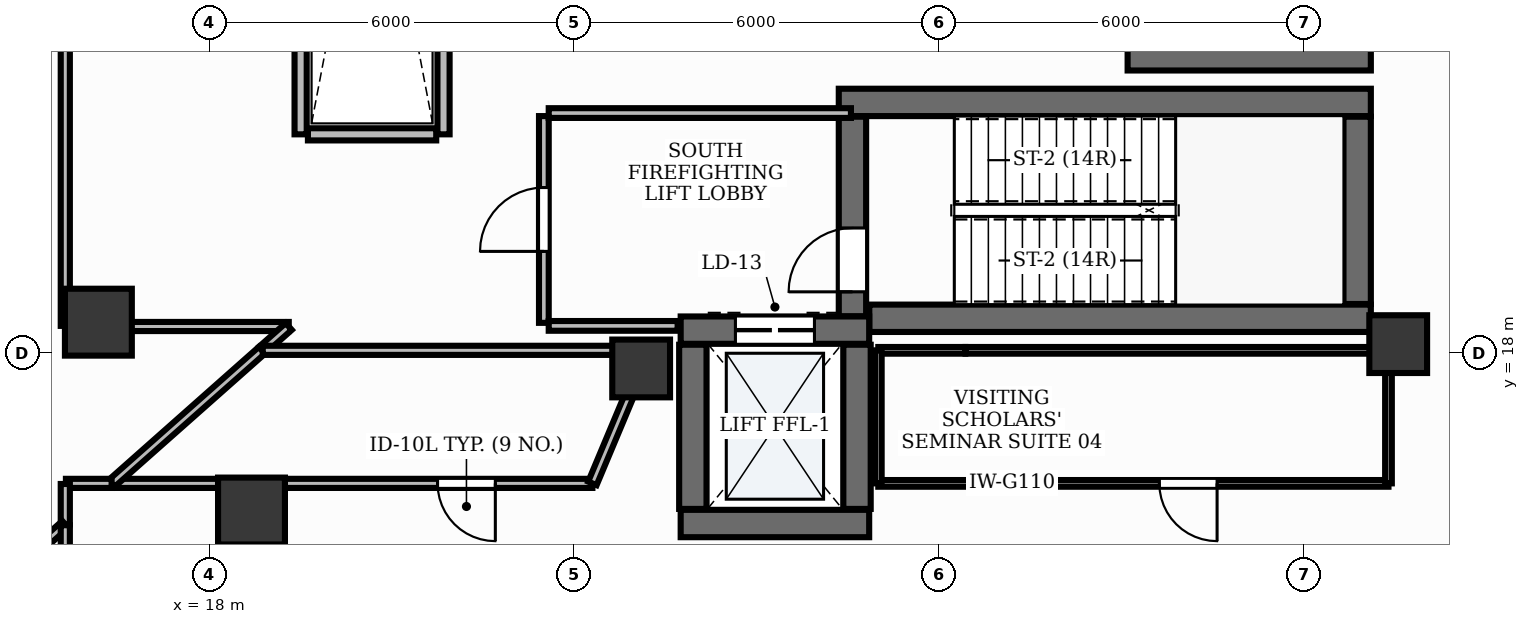
"""IFC4 building model, lengths in metres.
Left out: names, types, materials, properties, quantities, classifications, styles, units other than length and angle.
Written with IfcOpenShell. Run it as: python <this file> out.ifc"""

import sys

from ifc_helpers import new_model, si_unit, direction, frame, frame_2d, origin, origin_2d, place, context, subcontext, project, spatial, rectangle, extrude, element, fill, save


model = new_model("IFC4")
c1 = context("Model", 3, precision=1e-05, world=origin(), true_north=direction((0.0, 1.0)))
c2 = subcontext(c1, "Body", "Model", "MODEL_VIEW")
j1 = project(units=[si_unit("LENGTHUNIT", "METRE"), si_unit("PLANEANGLEUNIT", "RADIAN")], contexts=[c1])
p1 = place(None, origin())
s1 = spatial("IfcSite", under=j1, at=p1, CompositionType="ELEMENT")
p2 = place(p1, origin())
s2 = spatial("IfcBuilding", under=s1, at=p2, CompositionType="ELEMENT")
p3 = place(p2, frame((0.0, 0.0, 10.2)))
s3 = spatial("IfcBuildingStorey", under=s2, at=p3, CompositionType="ELEMENT", Elevation=10.2)
p4 = place(p3, frame((28.852, 18.575, 0.0), z_axis=(0.0, 0.0, 1.0), x_axis=(1.0, 0.0, 0.0)))
e1 = element("IfcWall", 1, at=p4, inside=s3, PredefinedType="SHEAR", context=c2, shape_type="SweptSolid", body=[
    extrude(rectangle(XDim=8.248, YDim=0.45, at=frame_2d((4.124, 0.0))), origin(), (0.0, 0.0, 1.0), 4.45),
])
p5 = place(p3, frame((28.35, 22.125, 0.0), z_axis=(0.0, 0.0, 1.0), x_axis=(1.0, 0.0, 0.0)))
e2 = element("IfcWall", 2, at=p5, inside=s3, PredefinedType="SHEAR", context=c2, shape_type="SweptSolid", body=[
    extrude(rectangle(XDim=8.75, YDim=0.45, at=frame_2d((4.375, 0.0))), origin(), (0.0, 0.0, 1.0), 4.45),
])
p6 = place(p3, frame((36.875, 18.81, 0.0), z_axis=(0.0, 0.0, 1.0), x_axis=(0.0, 1.0, 0.0)))
e3 = element("IfcWall", 3, at=p6, inside=s3, PredefinedType="SHEAR", context=c2, shape_type="SweptSolid", body=[
    extrude(rectangle(XDim=3.08, YDim=0.45, at=frame_2d((1.54, 0.0))), origin(), (0.0, 0.0, 1.0), 4.45),
])
p7 = place(p3, frame((28.575, 18.607, 0.0), z_axis=(0.0, 0.0, 1.0), x_axis=(0.0, 1.0, 0.0)))
e4 = element("IfcWall", 4, at=p7, inside=s3, PredefinedType="SHEAR", context=c2, shape_type="SweptSolid", body=[
    extrude(rectangle(XDim=3.283, YDim=0.45, at=frame_2d((1.642, 0.0))), origin(), (0.0, 0.0, 1.0), 4.45),
])
p8 = place(p7, frame((0.403, 0.0, 0.0)))
e5 = element("IfcOpeningElement", 5, at=p8, cuts=e4, PredefinedType="OPENING", context=c2, shape_type="SweptSolid", body=[
    extrude(rectangle(XDim=1.05, YDim=2.15, at=frame_2d((0.525, 1.075))), frame((0.0, 0.24, 0.0), z_axis=(0.0, -1.0, 0.0), x_axis=(1.0, 0.0, 0.0)), (0.0, 0.0, 1.0), 0.48),
])
p9 = place(p3, frame((33.1, 22.875, 0.0), z_axis=(0.0, 0.0, 1.0), x_axis=(1.0, 0.0, 0.0)))
e6 = element("IfcWall", 6, at=p9, inside=s3, PredefinedType="SHEAR", context=c2, shape_type="SweptSolid", body=[
    extrude(rectangle(XDim=4.0, YDim=0.45, at=frame_2d((2.0, 0.0))), origin(), (0.0, 0.0, 1.0), 4.45),
])
p10 = place(p3, frame((25.75, 15.2, 0.0), z_axis=(0.0, 0.0, 1.0), x_axis=(1.0, 0.0, 0.0)))
e7 = element("IfcWall", 7, at=p10, inside=s3, PredefinedType="SHEAR", context=c2, shape_type="SweptSolid", body=[
    extrude(rectangle(XDim=3.1, YDim=0.45, at=frame_2d((1.55, 0.0))), origin(), (0.0, 0.0, 1.0), 4.45),
])
p11 = place(p3, frame((25.75, 18.38, 0.0), z_axis=(0.0, 0.0, 1.0), x_axis=(1.0, 0.0, 0.0)))
e8 = element("IfcWall", 8, at=p11, inside=s3, PredefinedType="SHEAR", context=c2, shape_type="SweptSolid", body=[
    extrude(rectangle(XDim=3.1, YDim=0.45, at=frame_2d((1.55, 0.0))), origin(), (0.0, 0.0, 1.0), 4.45),
])
p12 = place(p11, frame((0.9, 0.0, 0.0)))
e9 = element("IfcOpeningElement", 9, at=p12, cuts=e8, PredefinedType="OPENING", context=c2, shape_type="SweptSolid", body=[
    extrude(rectangle(XDim=1.3, YDim=2.2, at=frame_2d((0.65, 1.1))), frame((0.0, 0.24, 0.0), z_axis=(0.0, -1.0, 0.0), x_axis=(1.0, 0.0, 0.0)), (0.0, 0.0, 1.0), 0.48),
])
for number, where, z_axis, x_axis in (
    (10, (25.95, 15.44, 0.0), (0.0, 0.0, 1.0), (0.0, 1.0, 0.0)),
    (11, (28.65, 15.44, 0.0), (0.0, 0.0, 1.0), (0.0, 1.0, 0.0)),
):
    element("IfcWall", number, at=place(p3, frame(where, z_axis=z_axis, x_axis=x_axis)), inside=s3, PredefinedType="SHEAR", context=c2, shape_type="SweptSolid", body=[
        extrude(rectangle(XDim=2.7, YDim=0.45, at=frame_2d((1.35, 0.0))), origin(), (0.0, 0.0, 1.0), 4.45),
    ])
for number, where, z_axis, x_axis in (
    (12, (25.1, 17.75, -0.0), (0.0, 0.0, 1.0), (1.0, 0.0, 0.0)),
    (13, (37.55, 18.15, -0.0), (0.0, 0.0, 1.0), (1.0, 0.0, 0.0)),
):
    element("IfcColumn", number, at=place(p3, frame(where, z_axis=z_axis, x_axis=x_axis)), inside=s3, PredefinedType="PILASTER", context=c2, shape_type="SweptSolid", body=[
        extrude(rectangle(XDim=0.95, YDim=0.95, at=origin_2d()), origin(), (0.0, 0.0, 1.0), 4.451),
    ])
for number, where, z_axis, x_axis in (
    (14, (16.174, 18.511, -0.0), (0.0, 0.0, 1.0), (1.0, 0.0, 0.0)),
    (15, (18.692, 15.405, -0.0), (0.0, 0.0, 1.0), (1.0, 0.0, 0.0)),
):
    element("IfcColumn", number, at=place(p3, frame(where, z_axis=z_axis, x_axis=x_axis)), inside=s3, PredefinedType="COLUMN", context=c2, shape_type="SweptSolid", body=[
        extrude(rectangle(XDim=1.1, YDim=1.1, at=origin_2d()), origin(), (0.0, 0.0, 1.0), 4.451),
    ])
for number, where, z_axis, x_axis in (
    (16, (19.5, 21.6, 0.0), (0.0, 0.0, 1.0), (0.0, 1.0, 0.0)),
    (17, (21.85, 21.6, 0.0), (0.0, 0.0, 1.0), (0.0, 1.0, 0.0)),
):
    element("IfcWall", number, at=place(p3, frame(where, z_axis=z_axis, x_axis=x_axis)), inside=s3, PredefinedType="PARTITIONING", context=c2, shape_type="SweptSolid", body=[
        extrude(rectangle(XDim=10.8, YDim=0.2, at=frame_2d((5.4, 0.0))), origin(), (0.0, 0.0, 1.0), 3.46),
    ])
p13 = place(p3, frame((19.62, 21.6, 0.0), z_axis=(0.0, 0.0, 1.0), x_axis=(1.0, 0.0, 0.0)))
e18 = element("IfcWall", 18, at=p13, inside=s3, PredefinedType="PARTITIONING", context=c2, shape_type="SweptSolid", body=[
    extrude(rectangle(XDim=2.11, YDim=0.2, at=frame_2d((1.055, 0.0))), origin(), (0.0, 0.0, 1.0), 3.46),
])
p14 = place(p3, frame((23.5, 18.5, 0.0), z_axis=(0.0, 0.0, 1.0), x_axis=(0.0, 1.0, 0.0)))
e19 = element("IfcWall", 19, at=p14, inside=s3, PredefinedType="PARTITIONING", context=c2, shape_type="SweptSolid", body=[
    extrude(rectangle(XDim=3.4, YDim=0.16, at=frame_2d((1.7, 0.0))), origin(), (0.0, 0.0, 1.0), 3.46),
])
p15 = place(p14, frame((1.175, 0.0, 0.0)))
e20 = element("IfcOpeningElement", 20, at=p15, cuts=e19, PredefinedType="OPENING", context=c2, shape_type="SweptSolid", body=[
    extrude(rectangle(XDim=1.05, YDim=2.15, at=frame_2d((0.525, 1.075))), frame((0.0, 0.095, 0.0), z_axis=(0.0, -1.0, 0.0), x_axis=(1.0, 0.0, 0.0)), (0.0, 0.0, 1.0), 0.19),
])
p16 = place(p3, frame((23.58, 21.95, 0.0), z_axis=(0.0, 0.0, 1.0), x_axis=(1.0, 0.0, 0.0)))
e21 = element("IfcWall", 21, at=p16, inside=s3, PredefinedType="PARTITIONING", context=c2, shape_type="SweptSolid", body=[
    extrude(rectangle(XDim=4.97, YDim=0.16, at=frame_2d((2.485, 0.0))), origin(), (0.0, 0.0, 1.0), 3.46),
])
p17 = place(p3, frame((23.58, 18.45, 0.0), z_axis=(0.0, 0.0, 1.0), x_axis=(1.0, 0.0, 0.0)))
e22 = element("IfcWall", 22, at=p17, inside=s3, PredefinedType="PARTITIONING", context=c2, shape_type="SweptSolid", body=[
    extrude(rectangle(XDim=2.12, YDim=0.16, at=frame_2d((1.06, 0.0))), origin(), (0.0, 0.0, 1.0), 3.46),
])
p18 = place(p3, frame((15.63, 24.885, 0.0), z_axis=(0.0, 0.0, 1.0), x_axis=(0.0, -1.0, 0.0)))
e23 = element("IfcWall", 23, at=p18, inside=s3, PredefinedType="PARTITIONING", context=c2, shape_type="SweptSolid", body=[
    extrude(rectangle(XDim=6.435, YDim=0.15, at=frame_2d((3.217, 0.0))), origin(), (0.0, 0.0, 1.0), 3.46),
])
p19 = place(p18, frame((0.24, 0.0, 0.0)))
e24 = element("IfcOpeningElement", 24, at=p19, cuts=e23, PredefinedType="OPENING", context=c2, shape_type="SweptSolid", body=[
    extrude(rectangle(XDim=0.95, YDim=2.15, at=frame_2d((0.475, 1.075))), frame((0.0, 0.09, 0.0), z_axis=(0.0, -1.0, 0.0), x_axis=(1.0, 0.0, 0.0)), (0.0, 0.0, 1.0), 0.18),
])
p20 = place(p3, frame((24.298, 15.86, 0.0), z_axis=(0.0, 0.0, 1.0), x_axis=(-1.0, 0.0, 0.0)))
e25 = element("IfcWall", 25, at=p20, inside=s3, PredefinedType="PARTITIONING", context=c2, shape_type="SweptSolid", body=[
    extrude(rectangle(XDim=7.892, YDim=0.15, at=frame_2d((3.946, 0.0))), origin(), (0.0, 0.0, 1.0), 3.46),
])
p21 = place(p20, frame((1.596, 0.0, 0.0)))
e26 = element("IfcOpeningElement", 26, at=p21, cuts=e25, PredefinedType="OPENING", context=c2, shape_type="SweptSolid", body=[
    extrude(rectangle(XDim=0.95, YDim=2.15, at=frame_2d((0.475, 1.075))), frame((0.0, 0.09, 0.0), z_axis=(0.0, -1.0, 0.0), x_axis=(1.0, 0.0, 0.0)), (0.0, 0.0, 1.0), 0.18),
])
p22 = place(p3, frame((37.39, 15.86, 0.0), z_axis=(0.0, 0.0, 1.0), x_axis=(-1.0, 0.0, 0.0)))
e27 = element("IfcWall", 27, at=p22, inside=s3, PredefinedType="MOVABLE", context=c2, shape_type="SweptSolid", body=[
    extrude(rectangle(XDim=8.39, YDim=0.11, at=frame_2d((4.195, 0.0))), origin(), (0.0, 0.0, 1.0), 3.46),
])
p23 = place(p22, frame((2.819, 0.0, 0.0)))
e28 = element("IfcOpeningElement", 28, at=p23, cuts=e27, PredefinedType="OPENING", context=c2, shape_type="SweptSolid", body=[
    extrude(rectangle(XDim=0.95, YDim=2.15, at=frame_2d((0.475, 1.075))), frame((0.0, 0.07, 0.0), z_axis=(0.0, -1.0, 0.0), x_axis=(1.0, 0.0, 0.0)), (0.0, 0.0, 1.0), 0.14),
])
p24 = place(p3, frame((15.64, 18.44, 0.0), z_axis=(0.0, 0.0, 1.0), x_axis=(1.0, 0.0, 0.0)))
e29 = element("IfcWall", 29, at=p24, inside=s3, PredefinedType="PARTITIONING", context=c2, shape_type="SweptSolid", body=[
    extrude(rectangle(XDim=3.665, YDim=0.15, at=frame_2d((1.833, 0.0))), origin(), (0.0, 0.0, 1.0), 3.46),
])
p25 = place(p3, frame((19.305, 18.44, 0.0), z_axis=(0.0, 0.0, 1.0), x_axis=(-0.748582262775, -0.66304192617, 0.0)))
e30 = element("IfcWall", 30, at=p25, inside=s3, PredefinedType="PARTITIONING", context=c2, shape_type="SweptSolid", body=[
    extrude(rectangle(XDim=0.585, YDim=0.15, at=frame_2d((0.292, 0.0))), origin(), (0.0, 0.0, 1.0), 3.46),
])
p26 = place(p3, frame((18.862, 18.048, 0.0), z_axis=(0.0, 0.0, 1.0), x_axis=(-0.748677348716, -0.662934557494, 0.0)))
e31 = element("IfcWall", 31, at=p26, inside=s3, PredefinedType="PARTITIONING", context=c2, shape_type="SweptSolid", body=[
    extrude(rectangle(XDim=3.3, YDim=0.15, at=frame_2d((1.65, 0.0))), origin(), (0.0, 0.0, 1.0), 3.46),
])
p27 = place(p3, frame((16.392, 15.86, 0.0), z_axis=(0.0, 0.0, 1.0), x_axis=(-1.0, 0.0, 0.0)))
e32 = element("IfcWall", 32, at=p27, inside=s3, PredefinedType="PARTITIONING", context=c2, shape_type="SweptSolid", body=[
    extrude(rectangle(XDim=0.752, YDim=0.15, at=frame_2d((0.376, 0.0))), origin(), (0.0, 0.0, 1.0), 3.46),
])
p28 = place(p3, frame((15.63, 15.85, 0.0), z_axis=(0.0, 0.0, 1.0), x_axis=(0.0, -1.0, 0.0)))
e33 = element("IfcWall", 33, at=p28, inside=s3, PredefinedType="PARTITIONING", context=c2, shape_type="SweptSolid", body=[
    extrude(rectangle(XDim=0.665, YDim=0.15, at=frame_2d((0.333, 0.0))), origin(), (0.0, 0.0, 1.0), 3.46),
])
p29 = place(p3, frame((15.63, 15.185, 0.0), z_axis=(0.0, 0.0, 1.0), x_axis=(-0.748642683945, -0.662973703683, 0.0)))
e34 = element("IfcWall", 34, at=p29, inside=s3, PredefinedType="PARTITIONING", context=c2, shape_type="SweptSolid", body=[
    extrude(rectangle(XDim=2.858, YDim=0.15, at=frame_2d((1.429, 0.0))), origin(), (0.0, 0.0, 1.0), 3.46),
])
p30 = place(p3, frame((25.216, 18.048, 0.0), z_axis=(0.0, 0.0, 1.0), x_axis=(-0.386879098856, -0.922130447859, 0.0)))
e35 = element("IfcWall", 35, at=p30, inside=s3, PredefinedType="PARTITIONING", context=c2, shape_type="SweptSolid", body=[
    extrude(rectangle(XDim=2.373, YDim=0.15, at=frame_2d((1.187, 0.0))), origin(), (0.0, 0.0, 1.0), 3.46),
])
p31 = place(p3, frame((18.877, 18.048, 0.0), z_axis=(0.0, 0.0, 1.0), x_axis=(1.0, 0.0, 0.0)))
e36 = element("IfcWall", 36, at=p31, inside=s3, PredefinedType="PARTITIONING", context=c2, shape_type="SweptSolid", body=[
    extrude(rectangle(XDim=6.339, YDim=0.15, at=frame_2d((3.169, 0.0))), origin(), (0.0, 0.0, 1.0), 3.46),
])
p32 = place(p3, frame((15.63, 15.172, 0.0), z_axis=(0.0, 0.0, 1.0), x_axis=(0.0, -1.0, 0.0)))
e37 = element("IfcWall", 37, at=p32, inside=s3, PredefinedType="PARTITIONING", context=c2, shape_type="SweptSolid", body=[
    extrude(rectangle(XDim=2.972, YDim=0.15, at=frame_2d((1.486, 0.0))), origin(), (0.0, 0.0, 1.0), 3.46),
])
p33 = place(p3, frame((29.0, 18.048, 0.0), z_axis=(0.0, 0.0, 1.0), x_axis=(1.0, 0.0, 0.0)))
e38 = element("IfcWall", 38, at=p33, inside=s3, PredefinedType="MOVABLE", context=c2, shape_type="SweptSolid", body=[
    extrude(rectangle(XDim=1.43, YDim=0.11, at=frame_2d((0.715, 0.0))), origin(), (0.0, 0.0, 1.0), 3.46),
])
p34 = place(p3, frame((30.435, 18.048, 0.0), z_axis=(0.0, 0.0, 1.0), x_axis=(1.0, 0.0, 0.0)))
e39 = element("IfcWall", 39, at=p34, inside=s3, PredefinedType="MOVABLE", context=c2, shape_type="SweptSolid", body=[
    extrude(rectangle(XDim=6.955, YDim=0.11, at=frame_2d((3.478, 0.0))), origin(), (0.0, 0.0, 1.0), 3.46),
])
p35 = place(p3, frame((37.39, 18.048, 0.0), z_axis=(0.0, 0.0, 1.0), x_axis=(0.0, -1.0, 0.0)))
e40 = element("IfcWall", 40, at=p35, inside=s3, PredefinedType="MOVABLE", context=c2, shape_type="SweptSolid", body=[
    extrude(rectangle(XDim=2.188, YDim=0.11, at=frame_2d((1.094, 0.0))), origin(), (0.0, 0.0, 1.0), 3.46),
])
p36 = place(p3, frame((29.0, 15.86, 0.0), z_axis=(0.0, 0.0, 1.0), x_axis=(0.0, 1.0, 0.0)))
e41 = element("IfcWall", 41, at=p36, inside=s3, PredefinedType="MOVABLE", context=c2, shape_type="SweptSolid", body=[
    extrude(rectangle(XDim=2.188, YDim=0.11, at=frame_2d((1.094, 0.0))), origin(), (0.0, 0.0, 1.0), 3.46),
])
p37 = place(p8, origin())
e42 = element("IfcDoor", 42, at=p37, inside=s3, OperationType="SINGLE_SWING_LEFT", PredefinedType="DOOR", context=c2, shape_type="SweptSolid", body=[
    extrude(rectangle(XDim=1.05, YDim=2.15, at=frame_2d((0.525, 1.075))), frame((0.0, 0.025, 0.0), z_axis=(0.0, -1.0, 0.0), x_axis=(1.0, 0.0, 0.0)), (0.0, 0.0, 1.0), 0.05),
])
fill(e5, e42)
p38 = place(p12, origin())
e43 = element("IfcDoor", 43, at=p38, inside=s3, OperationType="DOUBLE_DOOR_SLIDING", PredefinedType="DOOR", context=c2, shape_type="SweptSolid", body=[
    extrude(rectangle(XDim=1.3, YDim=2.2, at=frame_2d((0.65, 1.1))), frame((0.0, 0.025, 0.0), z_axis=(0.0, -1.0, 0.0), x_axis=(1.0, 0.0, 0.0)), (0.0, 0.0, 1.0), 0.05),
])
fill(e9, e43)
p39 = place(p15, origin())
e44 = element("IfcDoor", 44, at=p39, inside=s3, OperationType="SINGLE_SWING_LEFT", PredefinedType="DOOR", context=c2, shape_type="SweptSolid", body=[
    extrude(rectangle(XDim=1.05, YDim=2.15, at=frame_2d((0.525, 1.075))), frame((0.0, 0.025, 0.0), z_axis=(0.0, -1.0, 0.0), x_axis=(1.0, 0.0, 0.0)), (0.0, 0.0, 1.0), 0.05),
])
fill(e20, e44)
p40 = place(p21, origin())
e45 = element("IfcDoor", 45, at=p40, inside=s3, OperationType="SINGLE_SWING_LEFT", PredefinedType="DOOR", context=c2, shape_type="SweptSolid", body=[
    extrude(rectangle(XDim=0.95, YDim=2.15, at=frame_2d((0.475, 1.075))), frame((0.0, 0.025, 0.0), z_axis=(0.0, -1.0, 0.0), x_axis=(1.0, 0.0, 0.0)), (0.0, 0.0, 1.0), 0.05),
])
fill(e26, e45)
p41 = place(p23, origin())
e46 = element("IfcDoor", 46, at=p41, inside=s3, OperationType="SINGLE_SWING_LEFT", PredefinedType="DOOR", context=c2, shape_type="SweptSolid", body=[
    extrude(rectangle(XDim=0.95, YDim=2.15, at=frame_2d((0.475, 1.075))), frame((0.0, 0.025, 0.0), z_axis=(0.0, -1.0, 0.0), x_axis=(1.0, 0.0, 0.0)), (0.0, 0.0, 1.0), 0.05),
])
fill(e28, e46)
save(model, sys.argv[1])
